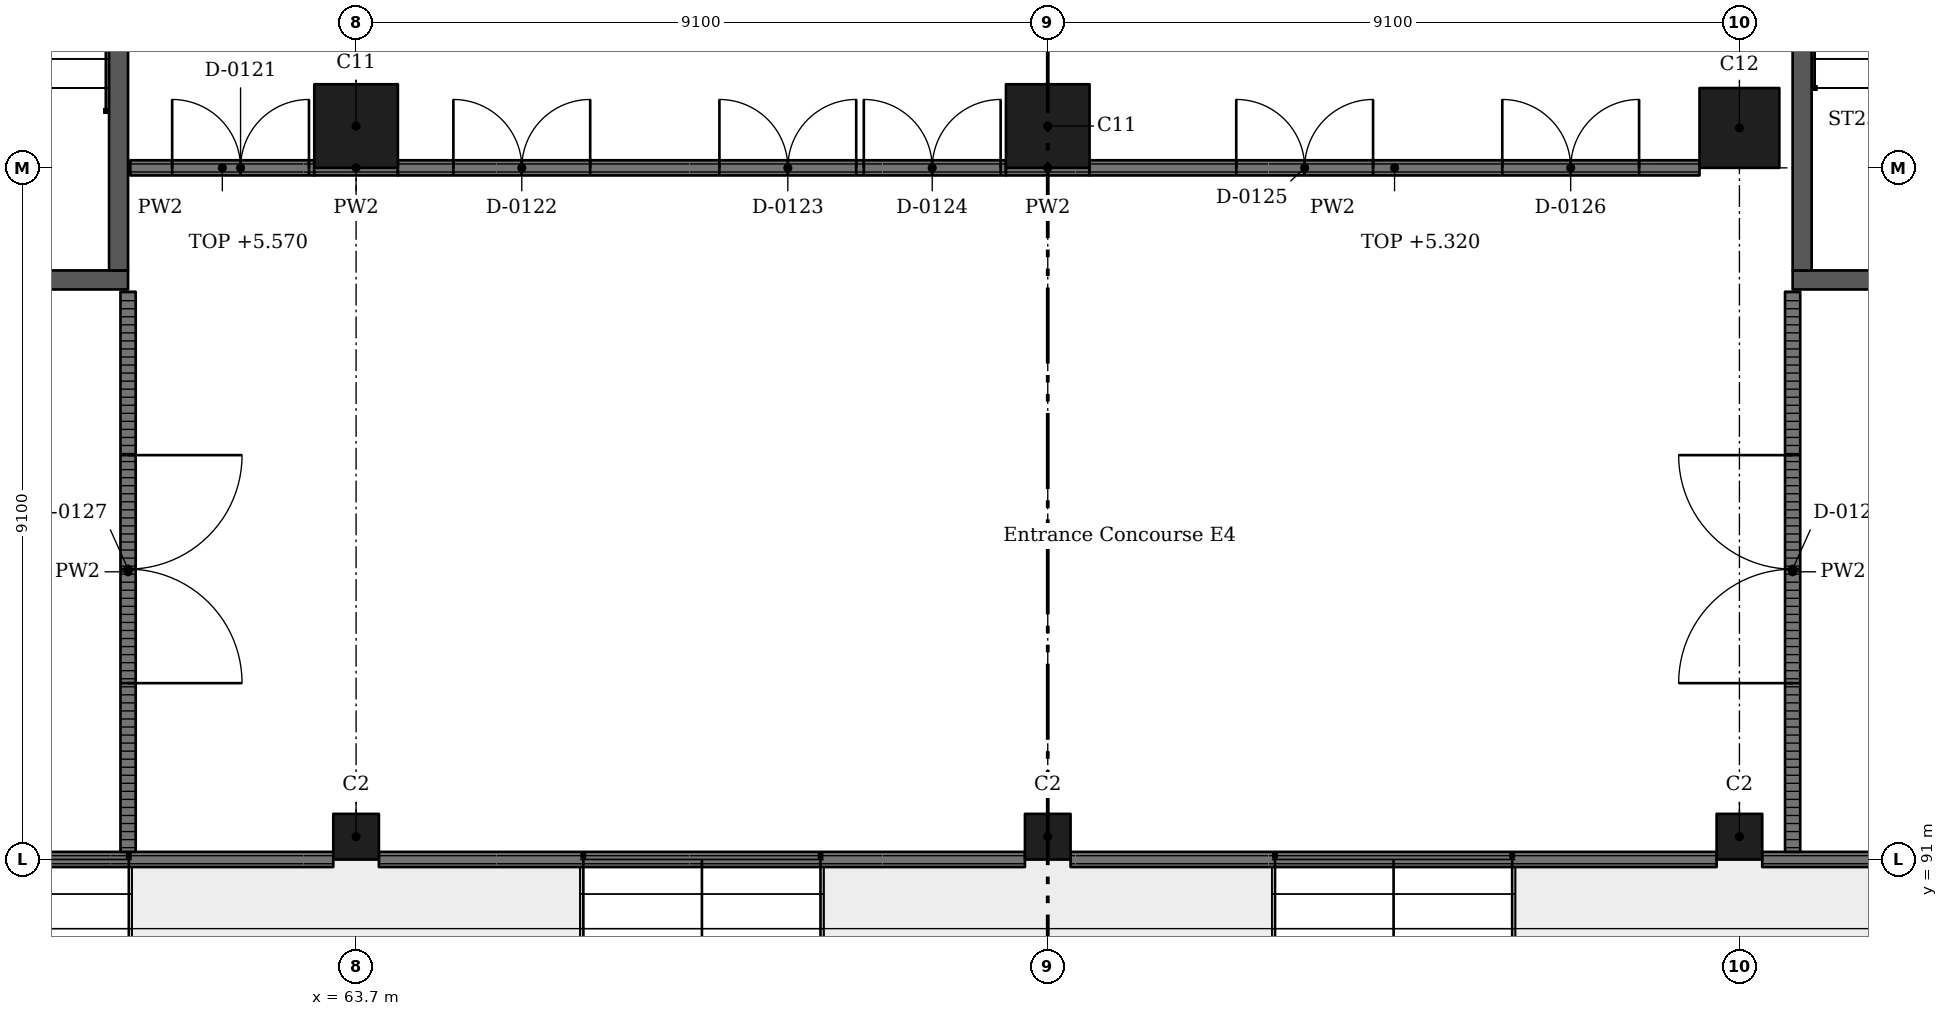
"""IFC4 building model, lengths in metres.
Left out: names, types, materials, properties, quantities, classifications, styles, units other than length and angle.
Written with IfcOpenShell. Run it as: python <this file> out.ifc"""

import sys

from ifc_helpers import new_model, si_unit, direction, frame, frame_2d, origin, origin_2d, place, context, subcontext, project, spatial, rectangle, extrude, element, fill, save


model = new_model("IFC4")
c1 = context("Model", 3, precision=1e-05, world=origin(), true_north=direction((0.0, 1.0)))
c2 = subcontext(c1, "Body", "Model", "MODEL_VIEW")
j1 = project(units=[si_unit("LENGTHUNIT", "METRE"), si_unit("PLANEANGLEUNIT", "RADIAN")], contexts=[c1])
p1 = place(None, origin())
s1 = spatial("IfcSite", under=j1, at=p1, CompositionType="ELEMENT")
p2 = place(p1, origin())
s2 = spatial("IfcBuilding", under=s1, at=p2, CompositionType="ELEMENT")
p3 = place(p2, origin())
s3 = spatial("IfcBuildingStorey", under=s2, at=p3, CompositionType="ELEMENT", Elevation=0.0)
p4 = place(p3, frame((63.7, 91.3, -0.4), z_axis=(0.0, 0.0, 1.0), x_axis=(1.0, 0.0, 0.0)))
e1 = element("IfcColumn", 1, at=p4, inside=s3, PredefinedType="COLUMN", context=c2, shape_type="SweptSolid", body=[
    extrude(rectangle(XDim=0.6, YDim=0.6, at=origin_2d()), origin(), (0.0, 0.0, 1.0), 6.77),
])
p5 = place(p3, frame((63.7, 100.65, -0.4), z_axis=(0.0, 0.0, 1.0), x_axis=(1.0, 0.0, 0.0)))
e2 = element("IfcColumn", 2, at=p5, inside=s3, PredefinedType="COLUMN", context=c2, shape_type="SweptSolid", body=[
    extrude(rectangle(XDim=1.1, YDim=1.1, at=origin_2d()), origin(), (0.0, 0.0, 1.0), 6.77),
])
p6 = place(p3, frame((72.8, 91.3, -0.4), z_axis=(0.0, 0.0, 1.0), x_axis=(1.0, 0.0, 0.0)))
e3 = element("IfcColumn", 3, at=p6, inside=s3, PredefinedType="COLUMN", context=c2, shape_type="SweptSolid", body=[
    extrude(rectangle(XDim=0.6, YDim=0.6, at=origin_2d()), origin(), (0.0, 0.0, 1.0), 6.77),
])
p7 = place(p3, frame((72.8, 100.65, -0.4), z_axis=(0.0, 0.0, 1.0), x_axis=(1.0, 0.0, 0.0)))
e4 = element("IfcColumn", 4, at=p7, inside=s3, PredefinedType="COLUMN", context=c2, shape_type="SweptSolid", body=[
    extrude(rectangle(XDim=1.1, YDim=1.1, at=origin_2d()), origin(), (0.0, 0.0, 1.0), 6.77),
])
p8 = place(p3, frame((81.9, 91.3, -0.4), z_axis=(0.0, 0.0, 1.0), x_axis=(1.0, 0.0, 0.0)))
e5 = element("IfcColumn", 5, at=p8, inside=s3, PredefinedType="COLUMN", context=c2, shape_type="SweptSolid", body=[
    extrude(rectangle(XDim=0.6, YDim=0.6, at=origin_2d()), origin(), (0.0, 0.0, 1.0), 6.77),
])
p9 = place(p3, frame((81.9, 100.625, -0.4), z_axis=(0.0, 0.0, 1.0), x_axis=(1.0, 0.0, 0.0)))
e6 = element("IfcColumn", 6, at=p9, inside=s3, PredefinedType="COLUMN", context=c2, shape_type="SweptSolid", body=[
    extrude(rectangle(XDim=1.05, YDim=1.05, at=origin_2d()), origin(), (0.0, 0.0, 1.0), 6.77),
])
p10 = place(p3, frame((60.7, 98.625, -0.4), z_axis=(0.0, 0.0, 1.0), x_axis=(-1.0, 0.0, 0.0)))
e7 = element("IfcWall", 7, at=p10, inside=s3, PredefinedType="SHEAR", context=c2, shape_type="SweptSolid", body=[
    extrude(rectangle(XDim=5.4, YDim=0.25, at=frame_2d((2.7, 0.0))), origin(), (0.0, 0.0, 1.0), 6.77),
])
p11 = place(p10, frame((1.5, 0.0, 0.4)))
e8 = element("IfcOpeningElement", 8, at=p11, cuts=e7, PredefinedType="OPENING", context=c2, shape_type="SweptSolid", body=[
    extrude(rectangle(XDim=2.4, YDim=2.1, at=frame_2d((1.2, 1.05))), frame((0.0, 0.135, 0.0), z_axis=(0.0, -1.0, 0.0), x_axis=(1.0, 0.0, 0.0)), (0.0, 0.0, 1.0), 0.27),
])
p12 = place(p3, frame((60.575, 108.35, -0.4), z_axis=(0.0, 0.0, 1.0), x_axis=(0.0, -1.0, 0.0)))
e9 = element("IfcWall", 9, at=p12, inside=s3, PredefinedType="SHEAR", context=c2, shape_type="SweptSolid", body=[
    extrude(rectangle(XDim=9.6, YDim=0.25, at=frame_2d((4.8, 0.0))), origin(), (0.0, 0.0, 1.0), 6.77),
])
p13 = place(p3, frame((88.0, 98.625, -0.4), z_axis=(0.0, 0.0, 1.0), x_axis=(-1.0, 0.0, 0.0)))
e10 = element("IfcWall", 10, at=p13, inside=s3, PredefinedType="SHEAR", context=c2, shape_type="SweptSolid", body=[
    extrude(rectangle(XDim=5.4, YDim=0.25, at=frame_2d((2.7, 0.0))), origin(), (0.0, 0.0, 1.0), 6.77),
])
p14 = place(p13, frame((1.5, 0.0, 0.4)))
e11 = element("IfcOpeningElement", 11, at=p14, cuts=e10, PredefinedType="OPENING", context=c2, shape_type="SweptSolid", body=[
    extrude(rectangle(XDim=2.4, YDim=2.1, at=frame_2d((1.2, 1.05))), frame((0.0, 0.135, 0.0), z_axis=(0.0, -1.0, 0.0), x_axis=(1.0, 0.0, 0.0)), (0.0, 0.0, 1.0), 0.27),
])
p15 = place(p3, frame((82.725, 108.35, -0.4), z_axis=(0.0, 0.0, 1.0), x_axis=(0.0, -1.0, 0.0)))
e12 = element("IfcWall", 12, at=p15, inside=s3, PredefinedType="SHEAR", context=c2, shape_type="SweptSolid", body=[
    extrude(rectangle(XDim=9.6, YDim=0.25, at=frame_2d((4.8, 0.0))), origin(), (0.0, 0.0, 1.0), 6.77),
])
p16 = place(p3, frame((54.9, 91.0, 0.0), z_axis=(0.0, 0.0, 1.0), x_axis=(1.0, 0.0, 0.0)))
e13 = element("IfcWall", 13, at=p16, inside=s3, PredefinedType="PARTITIONING", context=c2, shape_type="SweptSolid", body=[
    extrude(rectangle(XDim=8.5, YDim=0.2, at=frame_2d((4.25, 0.0))), origin(), (0.0, 0.0, 1.0), 5.02),
])
p17 = place(p3, frame((60.7, 98.47, 0.0), z_axis=(0.0, 0.0, 1.0), x_axis=(0.0, -1.0, 0.0)))
e14 = element("IfcWall", 14, at=p17, inside=s3, PredefinedType="PARTITIONING", context=c2, shape_type="SweptSolid", body=[
    extrude(rectangle(XDim=7.37, YDim=0.2, at=frame_2d((3.685, 0.0))), origin(), (0.0, 0.0, 1.0), 6.02),
])
p18 = place(p17, frame((2.15, 0.0, 0.0)))
e15 = element("IfcOpeningElement", 15, at=p18, cuts=e14, PredefinedType="OPENING", context=c2, shape_type="SweptSolid", body=[
    extrude(rectangle(XDim=3.0, YDim=2.4, at=frame_2d((1.5, 1.2))), frame((0.0, 0.11, 0.0), z_axis=(0.0, -1.0, 0.0), x_axis=(1.0, 0.0, 0.0)), (0.0, 0.0, 1.0), 0.22),
])
p19 = place(p3, frame((60.73, 100.1, 0.0), z_axis=(0.0, 0.0, 1.0), x_axis=(1.0, 0.0, 0.0)))
e16 = element("IfcWall", 16, at=p19, inside=s3, PredefinedType="PARTITIONING", context=c2, shape_type="SweptSolid", body=[
    extrude(rectangle(XDim=2.42, YDim=0.2, at=frame_2d((1.21, 0.0))), origin(), (0.0, 0.0, 1.0), 5.57),
])
p20 = place(p19, frame((0.55, 0.0, 0.0)))
e17 = element("IfcOpeningElement", 17, at=p20, cuts=e16, PredefinedType="OPENING", context=c2, shape_type="SweptSolid", body=[
    extrude(rectangle(XDim=1.8, YDim=2.4, at=frame_2d((0.9, 1.2))), frame((0.0, 0.11, 0.0), z_axis=(0.0, -1.0, 0.0), x_axis=(1.0, 0.0, 0.0)), (0.0, 0.0, 1.0), 0.22),
])
for number, where, z_axis, x_axis in (
    (18, (72.5, 91.0, 0.0), (0.0, 0.0, 1.0), (-1.0, 0.0, 0.0)),
    (19, (81.6, 91.0, 0.0), (0.0, 0.0, 1.0), (-1.0, 0.0, 0.0)),
    (20, (82.2, 91.0, 0.0), (0.0, 0.0, 1.0), (1.0, 0.0, 0.0)),
):
    element("IfcWall", number, at=place(p3, frame(where, z_axis=z_axis, x_axis=x_axis)), inside=s3, PredefinedType="PARTITIONING", context=c2, shape_type="SweptSolid", body=[
        extrude(rectangle(XDim=8.5, YDim=0.2, at=frame_2d((4.25, 0.0))), origin(), (0.0, 0.0, 1.0), 5.02),
    ])
p21 = place(p3, frame((82.6, 98.47, 0.0), z_axis=(0.0, 0.0, 1.0), x_axis=(0.0, -1.0, 0.0)))
e21 = element("IfcWall", 21, at=p21, inside=s3, PredefinedType="PARTITIONING", context=c2, shape_type="SweptSolid", body=[
    extrude(rectangle(XDim=7.37, YDim=0.2, at=frame_2d((3.685, 0.0))), origin(), (0.0, 0.0, 1.0), 6.02),
])
p22 = place(p21, frame((2.15, 0.0, 0.0)))
e22 = element("IfcOpeningElement", 22, at=p22, cuts=e21, PredefinedType="OPENING", context=c2, shape_type="SweptSolid", body=[
    extrude(rectangle(XDim=3.0, YDim=2.4, at=frame_2d((1.5, 1.2))), frame((0.0, 0.11, 0.0), z_axis=(0.0, -1.0, 0.0), x_axis=(1.0, 0.0, 0.0)), (0.0, 0.0, 1.0), 0.22),
])
p23 = place(p3, frame((63.15, 100.1, 0.0), z_axis=(0.0, 0.0, 1.0), x_axis=(1.0, 0.0, 0.0)))
e23 = element("IfcWall", 23, at=p23, inside=s3, PredefinedType="PARTITIONING", context=c2, shape_type="SweptSolid", body=[
    extrude(rectangle(XDim=1.1, YDim=0.2, at=frame_2d((0.55, 0.0))), origin(), (0.0, 0.0, 1.0), 6.02),
])
p24 = place(p3, frame((64.25, 100.1, 0.0), z_axis=(0.0, 0.0, 1.0), x_axis=(1.0, 0.0, 0.0)))
e24 = element("IfcWall", 24, at=p24, inside=s3, PredefinedType="PARTITIONING", context=c2, shape_type="SweptSolid", body=[
    extrude(rectangle(XDim=8.0, YDim=0.2, at=frame_2d((4.0, 0.0))), origin(), (0.0, 0.0, 1.0), 5.32),
])
p25 = place(p24, frame((0.73, 0.0, 0.0)))
e25 = element("IfcOpeningElement", 25, at=p25, cuts=e24, PredefinedType="OPENING", context=c2, shape_type="SweptSolid", body=[
    extrude(rectangle(XDim=1.8, YDim=2.4, at=frame_2d((0.9, 1.2))), frame((0.0, 0.11, 0.0), z_axis=(0.0, -1.0, 0.0), x_axis=(1.0, 0.0, 0.0)), (0.0, 0.0, 1.0), 0.22),
])
p26 = place(p24, frame((4.23, 0.0, 0.0)))
e26 = element("IfcOpeningElement", 26, at=p26, cuts=e24, PredefinedType="OPENING", context=c2, shape_type="SweptSolid", body=[
    extrude(rectangle(XDim=1.8, YDim=2.4, at=frame_2d((0.9, 1.2))), frame((0.0, 0.11, 0.0), z_axis=(0.0, -1.0, 0.0), x_axis=(1.0, 0.0, 0.0)), (0.0, 0.0, 1.0), 0.22),
])
p27 = place(p24, frame((6.13, 0.0, 0.0)))
e27 = element("IfcOpeningElement", 27, at=p27, cuts=e24, PredefinedType="OPENING", context=c2, shape_type="SweptSolid", body=[
    extrude(rectangle(XDim=1.8, YDim=2.4, at=frame_2d((0.9, 1.2))), frame((0.0, 0.11, 0.0), z_axis=(0.0, -1.0, 0.0), x_axis=(1.0, 0.0, 0.0)), (0.0, 0.0, 1.0), 0.22),
])
p28 = place(p3, frame((72.25, 100.1, 0.0), z_axis=(0.0, 0.0, 1.0), x_axis=(1.0, 0.0, 0.0)))
e28 = element("IfcWall", 28, at=p28, inside=s3, PredefinedType="PARTITIONING", context=c2, shape_type="SweptSolid", body=[
    extrude(rectangle(XDim=1.1, YDim=0.2, at=frame_2d((0.55, 0.0))), origin(), (0.0, 0.0, 1.0), 6.02),
])
p29 = place(p3, frame((73.35, 100.1, 0.0), z_axis=(0.0, 0.0, 1.0), x_axis=(1.0, 0.0, 0.0)))
e29 = element("IfcWall", 29, at=p29, inside=s3, PredefinedType="PARTITIONING", context=c2, shape_type="SweptSolid", body=[
    extrude(rectangle(XDim=8.025, YDim=0.2, at=frame_2d((4.012, 0.0))), origin(), (0.0, 0.0, 1.0), 5.32),
])
p30 = place(p29, frame((1.93, 0.0, 0.0)))
e30 = element("IfcOpeningElement", 30, at=p30, cuts=e29, PredefinedType="OPENING", context=c2, shape_type="SweptSolid", body=[
    extrude(rectangle(XDim=1.8, YDim=2.4, at=frame_2d((0.9, 1.2))), frame((0.0, 0.11, 0.0), z_axis=(0.0, -1.0, 0.0), x_axis=(1.0, 0.0, 0.0)), (0.0, 0.0, 1.0), 0.22),
])
p31 = place(p29, frame((5.43, 0.0, 0.0)))
e31 = element("IfcOpeningElement", 31, at=p31, cuts=e29, PredefinedType="OPENING", context=c2, shape_type="SweptSolid", body=[
    extrude(rectangle(XDim=1.8, YDim=2.4, at=frame_2d((0.9, 1.2))), frame((0.0, 0.11, 0.0), z_axis=(0.0, -1.0, 0.0), x_axis=(1.0, 0.0, 0.0)), (0.0, 0.0, 1.0), 0.22),
])
p32 = place(p22, origin())
e32 = element("IfcDoor", 32, at=p32, inside=s3, OperationType="DOUBLE_DOOR_SINGLE_SWING", PredefinedType="DOOR", context=c2, shape_type="SweptSolid", body=[
    extrude(rectangle(XDim=3.0, YDim=2.4, at=frame_2d((1.5, 1.2))), frame((0.0, 0.025, 0.0), z_axis=(0.0, -1.0, 0.0), x_axis=(1.0, 0.0, 0.0)), (0.0, 0.0, 1.0), 0.05),
])
fill(e22, e32)
p33 = place(p20, origin())
e33 = element("IfcDoor", 33, at=p33, inside=s3, OperationType="DOUBLE_DOOR_SINGLE_SWING", PredefinedType="DOOR", context=c2, shape_type="SweptSolid", body=[
    extrude(rectangle(XDim=1.8, YDim=2.4, at=frame_2d((0.9, 1.2))), frame((0.0, 0.025, 0.0), z_axis=(0.0, -1.0, 0.0), x_axis=(1.0, 0.0, 0.0)), (0.0, 0.0, 1.0), 0.05),
])
fill(e17, e33)
p34 = place(p25, origin())
e34 = element("IfcDoor", 34, at=p34, inside=s3, OperationType="DOUBLE_DOOR_SINGLE_SWING", PredefinedType="DOOR", context=c2, shape_type="SweptSolid", body=[
    extrude(rectangle(XDim=1.8, YDim=2.4, at=frame_2d((0.9, 1.2))), frame((0.0, 0.025, 0.0), z_axis=(0.0, -1.0, 0.0), x_axis=(1.0, 0.0, 0.0)), (0.0, 0.0, 1.0), 0.05),
])
fill(e25, e34)
p35 = place(p26, origin())
e35 = element("IfcDoor", 35, at=p35, inside=s3, OperationType="DOUBLE_DOOR_SINGLE_SWING", PredefinedType="DOOR", context=c2, shape_type="SweptSolid", body=[
    extrude(rectangle(XDim=1.8, YDim=2.4, at=frame_2d((0.9, 1.2))), frame((0.0, 0.025, 0.0), z_axis=(0.0, -1.0, 0.0), x_axis=(1.0, 0.0, 0.0)), (0.0, 0.0, 1.0), 0.05),
])
fill(e26, e35)
p36 = place(p27, origin())
e36 = element("IfcDoor", 36, at=p36, inside=s3, OperationType="DOUBLE_DOOR_SINGLE_SWING", PredefinedType="DOOR", context=c2, shape_type="SweptSolid", body=[
    extrude(rectangle(XDim=1.8, YDim=2.4, at=frame_2d((0.9, 1.2))), frame((0.0, 0.025, 0.0), z_axis=(0.0, -1.0, 0.0), x_axis=(1.0, 0.0, 0.0)), (0.0, 0.0, 1.0), 0.05),
])
fill(e27, e36)
p37 = place(p30, origin())
e37 = element("IfcDoor", 37, at=p37, inside=s3, OperationType="DOUBLE_DOOR_SINGLE_SWING", PredefinedType="DOOR", context=c2, shape_type="SweptSolid", body=[
    extrude(rectangle(XDim=1.8, YDim=2.4, at=frame_2d((0.9, 1.2))), frame((0.0, 0.025, 0.0), z_axis=(0.0, -1.0, 0.0), x_axis=(1.0, 0.0, 0.0)), (0.0, 0.0, 1.0), 0.05),
])
fill(e30, e37)
p38 = place(p31, origin())
e38 = element("IfcDoor", 38, at=p38, inside=s3, OperationType="DOUBLE_DOOR_SINGLE_SWING", PredefinedType="DOOR", context=c2, shape_type="SweptSolid", body=[
    extrude(rectangle(XDim=1.8, YDim=2.4, at=frame_2d((0.9, 1.2))), frame((0.0, 0.025, 0.0), z_axis=(0.0, -1.0, 0.0), x_axis=(1.0, 0.0, 0.0)), (0.0, 0.0, 1.0), 0.05),
])
fill(e31, e38)
p39 = place(p18, origin())
e39 = element("IfcDoor", 39, at=p39, inside=s3, OperationType="DOUBLE_DOOR_SINGLE_SWING", PredefinedType="DOOR", context=c2, shape_type="SweptSolid", body=[
    extrude(rectangle(XDim=3.0, YDim=2.4, at=frame_2d((1.5, 1.2))), frame((0.0, 0.025, 0.0), z_axis=(0.0, -1.0, 0.0), x_axis=(1.0, 0.0, 0.0)), (0.0, 0.0, 1.0), 0.05),
])
fill(e15, e39)
save(model, sys.argv[1])
